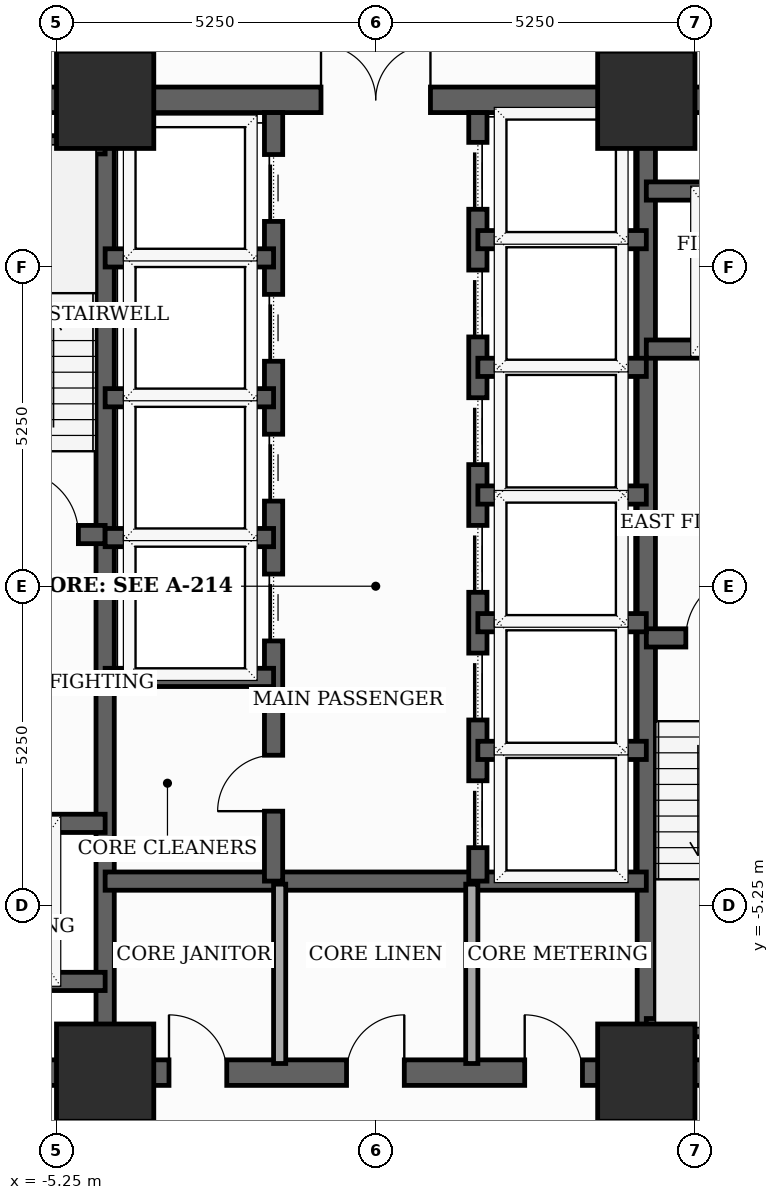
"""IFC4 building model, lengths in metres.
Left out: names, types, materials, properties, quantities, classifications, styles, units other than length and angle.
Written with IfcOpenShell. Run it as: python <this file> out.ifc"""

import sys

from ifc_helpers import new_model, si_unit, direction, frame, frame_2d, origin, origin_2d, place, context, subcontext, project, spatial, rectangle, extrude, element, fill, save


model = new_model("IFC4")
c1 = context("Model", 3, precision=1e-05, world=origin(), true_north=direction((0.0, 1.0)))
c2 = subcontext(c1, "Body", "Model", "MODEL_VIEW")
j1 = project(units=[si_unit("LENGTHUNIT", "METRE"), si_unit("PLANEANGLEUNIT", "RADIAN")], contexts=[c1])
p1 = place(None, origin())
s1 = spatial("IfcSite", under=j1, at=p1, CompositionType="ELEMENT")
p2 = place(p1, origin())
s2 = spatial("IfcBuilding", under=s1, at=p2, CompositionType="ELEMENT")
p3 = place(p2, frame((0.0, 0.0, 74.1)))
s3 = spatial("IfcBuildingStorey", under=s2, at=p3, CompositionType="ELEMENT", Elevation=74.1)
for number, where, z_axis, x_axis in (
    (1, (-4.45, -8.0, 0.0), (0.0, 0.0, 1.0), (1.0, 0.0, 0.0)),
    (2, (4.45, -8.0, 0.0), (0.0, 0.0, 1.0), (1.0, 0.0, 0.0)),
    (3, (4.45, 8.0, 0.0), (0.0, 0.0, 1.0), (1.0, 0.0, 0.0)),
    (4, (-4.45, 8.0, 0.0), (0.0, 0.0, 1.0), (1.0, 0.0, 0.0)),
):
    element("IfcColumn", number, at=place(p3, frame(where, z_axis=z_axis, x_axis=x_axis)), inside=s3, PredefinedType="COLUMN", context=c2, shape_type="SweptSolid", body=[
        extrude(rectangle(XDim=1.6, YDim=1.6, at=origin_2d()), origin(), (0.0, 0.0, 1.0), 3.7),
    ])
p4 = place(p3, frame((-8.0, -8.0, 0.0), z_axis=(0.0, 0.0, 1.0), x_axis=(1.0, 0.0, 0.0)))
e5 = element("IfcWall", 5, at=p4, inside=s3, PredefinedType="SHEAR", context=c2, shape_type="SweptSolid", body=[
    extrude(rectangle(XDim=16.0, YDim=0.42, at=frame_2d((8.0, 0.0))), origin(), (0.0, 0.0, 1.0), 3.5),
])
p5 = place(p4, frame((4.6, 0.0, 0.0)))
e6 = element("IfcOpeningElement", 6, at=p5, cuts=e5, PredefinedType="OPENING", context=c2, shape_type="SweptSolid", body=[
    extrude(rectangle(XDim=0.95, YDim=2.1, at=frame_2d((0.475, 1.05))), frame((0.0, 0.22, 0.0), z_axis=(0.0, -1.0, 0.0), x_axis=(1.0, 0.0, 0.0)), (0.0, 0.0, 1.0), 0.44),
])
p6 = place(p4, frame((7.52, 0.0, 0.0)))
e7 = element("IfcOpeningElement", 7, at=p6, cuts=e5, PredefinedType="OPENING", context=c2, shape_type="SweptSolid", body=[
    extrude(rectangle(XDim=0.95, YDim=2.1, at=frame_2d((0.475, 1.05))), frame((0.0, 0.22, 0.0), z_axis=(0.0, -1.0, 0.0), x_axis=(1.0, 0.0, 0.0)), (0.0, 0.0, 1.0), 0.44),
])
p7 = place(p4, frame((10.45, 0.0, 0.0)))
e8 = element("IfcOpeningElement", 8, at=p7, cuts=e5, PredefinedType="OPENING", context=c2, shape_type="SweptSolid", body=[
    extrude(rectangle(XDim=0.95, YDim=2.1, at=frame_2d((0.475, 1.05))), frame((0.0, 0.22, 0.0), z_axis=(0.0, -1.0, 0.0), x_axis=(1.0, 0.0, 0.0)), (0.0, 0.0, 1.0), 0.44),
])
p8 = place(p3, frame((-8.0, 8.0, 0.0), z_axis=(0.0, 0.0, 1.0), x_axis=(1.0, 0.0, 0.0)))
e9 = element("IfcWall", 9, at=p8, inside=s3, PredefinedType="SHEAR", context=c2, shape_type="SweptSolid", body=[
    extrude(rectangle(XDim=16.0, YDim=0.42, at=frame_2d((8.0, 0.0))), origin(), (0.0, 0.0, 1.0), 3.5),
])
p9 = place(p8, frame((7.1, 0.0, 0.0)))
e10 = element("IfcOpeningElement", 10, at=p9, cuts=e9, PredefinedType="OPENING", context=c2, shape_type="SweptSolid", body=[
    extrude(rectangle(XDim=1.8, YDim=2.15, at=frame_2d((0.9, 1.075))), frame((0.0, 0.22, 0.0), z_axis=(0.0, -1.0, 0.0), x_axis=(1.0, 0.0, 0.0)), (0.0, 0.0, 1.0), 0.44),
])
for number, where, z_axis, x_axis in (
    (11, (-4.45, -7.79, 0.0), (0.0, 0.0, 1.0), (0.0, 1.0, 0.0)),
    (12, (4.45, -7.79, 0.0), (0.0, 0.0, 1.0), (0.0, 1.0, 0.0)),
):
    element("IfcWall", number, at=place(p3, frame(where, z_axis=z_axis, x_axis=x_axis)), inside=s3, PredefinedType="SHEAR", context=c2, shape_type="SweptSolid", body=[
        extrude(rectangle(XDim=15.58, YDim=0.3, at=frame_2d((7.79, 0.0))), origin(), (0.0, 0.0, 1.0), 3.5),
    ])
p10 = place(p3, frame((-7.79, 0.85, 0.0), z_axis=(0.0, 0.0, 1.0), x_axis=(1.0, 0.0, 0.0)))
e13 = element("IfcWall", 13, at=p10, inside=s3, PredefinedType="SHEAR", context=c2, shape_type="SweptSolid", body=[
    extrude(rectangle(XDim=3.34, YDim=0.3, at=frame_2d((1.67, 0.0))), origin(), (0.0, 0.0, 1.0), 3.5),
])
p11 = place(p10, frame((1.85, 0.0, 0.0)))
e14 = element("IfcOpeningElement", 14, at=p11, cuts=e13, PredefinedType="OPENING", context=c2, shape_type="SweptSolid", body=[
    extrude(rectangle(XDim=1.05, YDim=2.15, at=frame_2d((0.525, 1.075))), frame((0.0, 0.16, 0.0), z_axis=(0.0, -1.0, 0.0), x_axis=(1.0, 0.0, 0.0)), (0.0, 0.0, 1.0), 0.32),
])
p12 = place(p3, frame((-7.79, 7.26, 0.0), z_axis=(0.0, 0.0, 1.0), x_axis=(1.0, 0.0, 0.0)))
e15 = element("IfcWall", 15, at=p12, inside=s3, PredefinedType="SHEAR", context=c2, shape_type="SweptSolid", body=[
    extrude(rectangle(XDim=3.34, YDim=0.3, at=frame_2d((1.67, 0.0))), origin(), (0.0, 0.0, 1.0), 3.5),
])
p13 = place(p3, frame((4.45, -0.85, 0.0), z_axis=(0.0, 0.0, 1.0), x_axis=(1.0, 0.0, 0.0)))
e16 = element("IfcWall", 16, at=p13, inside=s3, PredefinedType="SHEAR", context=c2, shape_type="SweptSolid", body=[
    extrude(rectangle(XDim=3.34, YDim=0.3, at=frame_2d((1.67, 0.0))), origin(), (0.0, 0.0, 1.0), 3.5),
])
p14 = place(p13, frame((0.65, 0.0, 0.0)))
e17 = element("IfcOpeningElement", 17, at=p14, cuts=e16, PredefinedType="OPENING", context=c2, shape_type="SweptSolid", body=[
    extrude(rectangle(XDim=1.05, YDim=2.15, at=frame_2d((0.525, 1.075))), frame((0.0, 0.16, 0.0), z_axis=(0.0, -1.0, 0.0), x_axis=(1.0, 0.0, 0.0)), (0.0, 0.0, 1.0), 0.32),
])
p15 = place(p3, frame((4.45, -7.26, 0.0), z_axis=(0.0, 0.0, 1.0), x_axis=(1.0, 0.0, 0.0)))
e18 = element("IfcWall", 18, at=p15, inside=s3, PredefinedType="SHEAR", context=c2, shape_type="SweptSolid", body=[
    extrude(rectangle(XDim=3.55, YDim=0.3, at=frame_2d((1.775, 0.0))), origin(), (0.0, 0.0, 1.0), 3.5),
])
p16 = place(p3, frame((-7.79, -3.9, 0.0), z_axis=(0.0, 0.0, 1.0), x_axis=(1.0, 0.0, 0.0)))
e19 = element("IfcWall", 19, at=p16, inside=s3, PredefinedType="SHEAR", context=c2, shape_type="SweptSolid", body=[
    extrude(rectangle(XDim=3.34, YDim=0.3, at=frame_2d((1.67, 0.0))), origin(), (0.0, 0.0, 1.0), 3.5),
])
p17 = place(p16, frame((1.27, 0.0, 0.0)))
e20 = element("IfcOpeningElement", 20, at=p17, cuts=e19, PredefinedType="OPENING", context=c2, shape_type="SweptSolid", body=[
    extrude(rectangle(XDim=1.1, YDim=2.1, at=frame_2d((0.55, 1.05))), frame((0.0, 0.16, 0.0), z_axis=(0.0, -1.0, 0.0), x_axis=(1.0, 0.0, 0.0)), (0.0, 0.0, 1.0), 0.32),
])
p18 = place(p3, frame((-7.79, -6.5, 0.0), z_axis=(0.0, 0.0, 1.0), x_axis=(1.0, 0.0, 0.0)))
e21 = element("IfcWall", 21, at=p18, inside=s3, PredefinedType="SHEAR", context=c2, shape_type="SweptSolid", body=[
    extrude(rectangle(XDim=3.34, YDim=0.3, at=frame_2d((1.67, 0.0))), origin(), (0.0, 0.0, 1.0), 3.5),
])
p19 = place(p3, frame((4.45, 3.9, 0.0), z_axis=(0.0, 0.0, 1.0), x_axis=(1.0, 0.0, 0.0)))
e22 = element("IfcWall", 22, at=p19, inside=s3, PredefinedType="SHEAR", context=c2, shape_type="SweptSolid", body=[
    extrude(rectangle(XDim=3.34, YDim=0.3, at=frame_2d((1.67, 0.0))), origin(), (0.0, 0.0, 1.0), 3.5),
])
p20 = place(p19, frame((1.18, 0.0, 0.0)))
e23 = element("IfcOpeningElement", 23, at=p20, cuts=e22, PredefinedType="OPENING", context=c2, shape_type="SweptSolid", body=[
    extrude(rectangle(XDim=1.1, YDim=2.1, at=frame_2d((0.55, 1.05))), frame((0.0, 0.16, 0.0), z_axis=(0.0, -1.0, 0.0), x_axis=(1.0, 0.0, 0.0)), (0.0, 0.0, 1.0), 0.32),
])
p21 = place(p3, frame((4.45, 6.5, 0.0), z_axis=(0.0, 0.0, 1.0), x_axis=(1.0, 0.0, 0.0)))
e24 = element("IfcWall", 24, at=p21, inside=s3, PredefinedType="SHEAR", context=c2, shape_type="SweptSolid", body=[
    extrude(rectangle(XDim=3.34, YDim=0.3, at=frame_2d((1.67, 0.0))), origin(), (0.0, 0.0, 1.0), 3.5),
])
p22 = place(p3, frame((-4.45, -4.85, 0.0), z_axis=(0.0, 0.0, 1.0), x_axis=(1.0, 0.0, 0.0)))
e25 = element("IfcWall", 25, at=p22, inside=s3, PredefinedType="SHEAR", context=c2, shape_type="SweptSolid", body=[
    extrude(rectangle(XDim=8.9, YDim=0.3, at=frame_2d((4.45, 0.0))), origin(), (0.0, 0.0, 1.0), 3.5),
])
p23 = place(p3, frame((-1.68, -4.85, 0.0), z_axis=(0.0, 0.0, 1.0), x_axis=(0.0, 1.0, 0.0)))
e26 = element("IfcWall", 26, at=p23, inside=s3, PredefinedType="SHEAR", context=c2, shape_type="SweptSolid", body=[
    extrude(rectangle(XDim=12.64, YDim=0.3, at=frame_2d((6.32, 0.0))), origin(), (0.0, 0.0, 1.0), 3.5),
])
p24 = place(p23, frame((3.95, 0.0, 0.0)))
e27 = element("IfcOpeningElement", 27, at=p24, cuts=e26, PredefinedType="OPENING", context=c2, shape_type="SweptSolid", body=[
    extrude(rectangle(XDim=1.1, YDim=2.1, at=frame_2d((0.55, 1.05))), frame((0.0, 0.16, 0.0), z_axis=(0.0, -1.0, 0.0), x_axis=(1.0, 0.0, 0.0)), (0.0, 0.0, 1.0), 0.32),
])
p25 = place(p23, frame((6.25, 0.0, 0.0)))
e28 = element("IfcOpeningElement", 28, at=p25, cuts=e26, PredefinedType="OPENING", context=c2, shape_type="SweptSolid", body=[
    extrude(rectangle(XDim=1.1, YDim=2.1, at=frame_2d((0.55, 1.05))), frame((0.0, 0.16, 0.0), z_axis=(0.0, -1.0, 0.0), x_axis=(1.0, 0.0, 0.0)), (0.0, 0.0, 1.0), 0.32),
])
p26 = place(p23, frame((8.55, 0.0, 0.0)))
e29 = element("IfcOpeningElement", 29, at=p26, cuts=e26, PredefinedType="OPENING", context=c2, shape_type="SweptSolid", body=[
    extrude(rectangle(XDim=1.1, YDim=2.1, at=frame_2d((0.55, 1.05))), frame((0.0, 0.16, 0.0), z_axis=(0.0, -1.0, 0.0), x_axis=(1.0, 0.0, 0.0)), (0.0, 0.0, 1.0), 0.32),
])
p27 = place(p23, frame((10.85, 0.0, 0.0)))
e30 = element("IfcOpeningElement", 30, at=p27, cuts=e26, PredefinedType="OPENING", context=c2, shape_type="SweptSolid", body=[
    extrude(rectangle(XDim=1.1, YDim=2.1, at=frame_2d((0.55, 1.05))), frame((0.0, 0.16, 0.0), z_axis=(0.0, -1.0, 0.0), x_axis=(1.0, 0.0, 0.0)), (0.0, 0.0, 1.0), 0.32),
])
p28 = place(p23, frame((1.15, 0.0, 0.0)))
e31 = element("IfcOpeningElement", 31, at=p28, cuts=e26, PredefinedType="OPENING", context=c2, shape_type="SweptSolid", body=[
    extrude(rectangle(XDim=0.92, YDim=2.1, at=frame_2d((0.46, 1.05))), frame((0.0, 0.16, 0.0), z_axis=(0.0, -1.0, 0.0), x_axis=(1.0, 0.0, 0.0)), (0.0, 0.0, 1.0), 0.32),
])
p29 = place(p3, frame((1.68, -4.85, 0.0), z_axis=(0.0, 0.0, 1.0), x_axis=(0.0, 1.0, 0.0)))
e32 = element("IfcWall", 32, at=p29, inside=s3, PredefinedType="SHEAR", context=c2, shape_type="SweptSolid", body=[
    extrude(rectangle(XDim=12.64, YDim=0.3, at=frame_2d((6.32, 0.0))), origin(), (0.0, 0.0, 1.0), 3.5),
])
p30 = place(p29, frame((0.55, 0.0, 0.0)))
e33 = element("IfcOpeningElement", 33, at=p30, cuts=e32, PredefinedType="OPENING", context=c2, shape_type="SweptSolid", body=[
    extrude(rectangle(XDim=1.1, YDim=2.1, at=frame_2d((0.55, 1.05))), frame((0.0, 0.16, 0.0), z_axis=(0.0, -1.0, 0.0), x_axis=(1.0, 0.0, 0.0)), (0.0, 0.0, 1.0), 0.32),
])
p31 = place(p29, frame((2.65, 0.0, 0.0)))
e34 = element("IfcOpeningElement", 34, at=p31, cuts=e32, PredefinedType="OPENING", context=c2, shape_type="SweptSolid", body=[
    extrude(rectangle(XDim=1.1, YDim=2.1, at=frame_2d((0.55, 1.05))), frame((0.0, 0.16, 0.0), z_axis=(0.0, -1.0, 0.0), x_axis=(1.0, 0.0, 0.0)), (0.0, 0.0, 1.0), 0.32),
])
p32 = place(p29, frame((4.75, 0.0, 0.0)))
e35 = element("IfcOpeningElement", 35, at=p32, cuts=e32, PredefinedType="OPENING", context=c2, shape_type="SweptSolid", body=[
    extrude(rectangle(XDim=1.1, YDim=2.1, at=frame_2d((0.55, 1.05))), frame((0.0, 0.16, 0.0), z_axis=(0.0, -1.0, 0.0), x_axis=(1.0, 0.0, 0.0)), (0.0, 0.0, 1.0), 0.32),
])
p33 = place(p29, frame((6.85, 0.0, 0.0)))
e36 = element("IfcOpeningElement", 36, at=p33, cuts=e32, PredefinedType="OPENING", context=c2, shape_type="SweptSolid", body=[
    extrude(rectangle(XDim=1.1, YDim=2.1, at=frame_2d((0.55, 1.05))), frame((0.0, 0.16, 0.0), z_axis=(0.0, -1.0, 0.0), x_axis=(1.0, 0.0, 0.0)), (0.0, 0.0, 1.0), 0.32),
])
p34 = place(p29, frame((8.95, 0.0, 0.0)))
e37 = element("IfcOpeningElement", 37, at=p34, cuts=e32, PredefinedType="OPENING", context=c2, shape_type="SweptSolid", body=[
    extrude(rectangle(XDim=1.1, YDim=2.1, at=frame_2d((0.55, 1.05))), frame((0.0, 0.16, 0.0), z_axis=(0.0, -1.0, 0.0), x_axis=(1.0, 0.0, 0.0)), (0.0, 0.0, 1.0), 0.32),
])
p35 = place(p29, frame((11.05, 0.0, 0.0)))
e38 = element("IfcOpeningElement", 38, at=p35, cuts=e32, PredefinedType="OPENING", context=c2, shape_type="SweptSolid", body=[
    extrude(rectangle(XDim=1.1, YDim=2.1, at=frame_2d((0.55, 1.05))), frame((0.0, 0.16, 0.0), z_axis=(0.0, -1.0, 0.0), x_axis=(1.0, 0.0, 0.0)), (0.0, 0.0, 1.0), 0.32),
])
for number, where, z_axis, x_axis in (
    (39, (-4.45, -1.5, 0.0), (0.0, 0.0, 1.0), (1.0, 0.0, 0.0)),
    (40, (-4.45, 0.8, 0.0), (0.0, 0.0, 1.0), (1.0, 0.0, 0.0)),
    (41, (-4.45, 3.1, 0.0), (0.0, 0.0, 1.0), (1.0, 0.0, 0.0)),
    (42, (-4.45, 5.4, 0.0), (0.0, 0.0, 1.0), (1.0, 0.0, 0.0)),
    (43, (1.68, 1.5, 0.0), (0.0, 0.0, 1.0), (1.0, 0.0, 0.0)),
    (44, (1.68, 3.6, 0.0), (0.0, 0.0, 1.0), (1.0, 0.0, 0.0)),
    (45, (1.68, 5.7, 0.0), (0.0, 0.0, 1.0), (1.0, 0.0, 0.0)),
    (46, (1.68, -2.7, 0.0), (0.0, 0.0, 1.0), (1.0, 0.0, 0.0)),
    (47, (1.68, -0.6, 0.0), (0.0, 0.0, 1.0), (1.0, 0.0, 0.0)),
):
    element("IfcWall", number, at=place(p3, frame(where, z_axis=z_axis, x_axis=x_axis)), inside=s3, PredefinedType="SHEAR", context=c2, shape_type="SweptSolid", body=[
        extrude(rectangle(XDim=2.77, YDim=0.3, at=frame_2d((1.385, 0.0))), origin(), (0.0, 0.0, 1.0), 3.5),
    ])
for number, where, z_axis, x_axis in (
    (48, (-1.58, -7.85, 0.0), (0.0, 0.0, 1.0), (0.0, 1.0, 0.0)),
    (49, (1.58, -7.85, 0.0), (0.0, 0.0, 1.0), (0.0, 1.0, 0.0)),
):
    element("IfcWall", number, at=place(p3, frame(where, z_axis=z_axis, x_axis=x_axis)), inside=s3, PredefinedType="SOLIDWALL", context=c2, shape_type="SweptSolid", body=[
        extrude(rectangle(XDim=2.95, YDim=0.2, at=frame_2d((1.475, 0.0))), origin(), (0.0, 0.0, 1.0), 2.885),
    ])
p36 = place(p5, origin())
e50 = element("IfcDoor", 50, at=p36, inside=s3, OperationType="SINGLE_SWING_LEFT", PredefinedType="DOOR", context=c2, shape_type="SweptSolid", body=[
    extrude(rectangle(XDim=0.95, YDim=2.1, at=frame_2d((0.475, 1.05))), frame((0.0, 0.025, 0.0), z_axis=(0.0, -1.0, 0.0), x_axis=(1.0, 0.0, 0.0)), (0.0, 0.0, 1.0), 0.05),
])
fill(e6, e50)
p37 = place(p6, origin())
e51 = element("IfcDoor", 51, at=p37, inside=s3, OperationType="SINGLE_SWING_RIGHT", PredefinedType="DOOR", context=c2, shape_type="SweptSolid", body=[
    extrude(rectangle(XDim=0.95, YDim=2.1, at=frame_2d((0.475, 1.05))), frame((0.0, 0.025, 0.0), z_axis=(0.0, -1.0, 0.0), x_axis=(1.0, 0.0, 0.0)), (0.0, 0.0, 1.0), 0.05),
])
fill(e7, e51)
p38 = place(p7, origin())
e52 = element("IfcDoor", 52, at=p38, inside=s3, OperationType="SINGLE_SWING_LEFT", PredefinedType="DOOR", context=c2, shape_type="SweptSolid", body=[
    extrude(rectangle(XDim=0.95, YDim=2.1, at=frame_2d((0.475, 1.05))), frame((0.0, 0.025, 0.0), z_axis=(0.0, -1.0, 0.0), x_axis=(1.0, 0.0, 0.0)), (0.0, 0.0, 1.0), 0.05),
])
fill(e8, e52)
p39 = place(p9, origin())
e53 = element("IfcDoor", 53, at=p39, inside=s3, OperationType="DOUBLE_DOOR_SINGLE_SWING", PredefinedType="DOOR", context=c2, shape_type="SweptSolid", body=[
    extrude(rectangle(XDim=1.8, YDim=2.15, at=frame_2d((0.9, 1.075))), frame((0.0, 0.025, 0.0), z_axis=(0.0, -1.0, 0.0), x_axis=(1.0, 0.0, 0.0)), (0.0, 0.0, 1.0), 0.05),
])
fill(e10, e53)
p40 = place(p11, origin())
e54 = element("IfcDoor", 54, at=p40, inside=s3, OperationType="SINGLE_SWING_LEFT", PredefinedType="DOOR", context=c2, shape_type="SweptSolid", body=[
    extrude(rectangle(XDim=1.05, YDim=2.15, at=frame_2d((0.525, 1.075))), frame((0.0, 0.025, 0.0), z_axis=(0.0, -1.0, 0.0), x_axis=(1.0, 0.0, 0.0)), (0.0, 0.0, 1.0), 0.05),
])
fill(e14, e54)
p41 = place(p14, origin())
e55 = element("IfcDoor", 55, at=p41, inside=s3, OperationType="SINGLE_SWING_RIGHT", PredefinedType="DOOR", context=c2, shape_type="SweptSolid", body=[
    extrude(rectangle(XDim=1.05, YDim=2.15, at=frame_2d((0.525, 1.075))), frame((0.0, 0.025, 0.0), z_axis=(0.0, -1.0, 0.0), x_axis=(1.0, 0.0, 0.0)), (0.0, 0.0, 1.0), 0.05),
])
fill(e17, e55)
p42 = place(p24, origin())
e56 = element("IfcDoor", 56, at=p42, inside=s3, OperationType="SLIDING_TO_LEFT", PredefinedType="DOOR", context=c2, shape_type="SweptSolid", body=[
    extrude(rectangle(XDim=1.1, YDim=2.1, at=frame_2d((0.55, 1.05))), frame((0.0, 0.025, 0.0), z_axis=(0.0, -1.0, 0.0), x_axis=(1.0, 0.0, 0.0)), (0.0, 0.0, 1.0), 0.05),
])
fill(e27, e56)
p43 = place(p25, origin())
e57 = element("IfcDoor", 57, at=p43, inside=s3, OperationType="SLIDING_TO_LEFT", PredefinedType="DOOR", context=c2, shape_type="SweptSolid", body=[
    extrude(rectangle(XDim=1.1, YDim=2.1, at=frame_2d((0.55, 1.05))), frame((0.0, 0.025, 0.0), z_axis=(0.0, -1.0, 0.0), x_axis=(1.0, 0.0, 0.0)), (0.0, 0.0, 1.0), 0.05),
])
fill(e28, e57)
p44 = place(p26, origin())
e58 = element("IfcDoor", 58, at=p44, inside=s3, OperationType="SLIDING_TO_LEFT", PredefinedType="DOOR", context=c2, shape_type="SweptSolid", body=[
    extrude(rectangle(XDim=1.1, YDim=2.1, at=frame_2d((0.55, 1.05))), frame((0.0, 0.025, 0.0), z_axis=(0.0, -1.0, 0.0), x_axis=(1.0, 0.0, 0.0)), (0.0, 0.0, 1.0), 0.05),
])
fill(e29, e58)
p45 = place(p27, origin())
e59 = element("IfcDoor", 59, at=p45, inside=s3, OperationType="SLIDING_TO_LEFT", PredefinedType="DOOR", context=c2, shape_type="SweptSolid", body=[
    extrude(rectangle(XDim=1.1, YDim=2.1, at=frame_2d((0.55, 1.05))), frame((0.0, 0.025, 0.0), z_axis=(0.0, -1.0, 0.0), x_axis=(1.0, 0.0, 0.0)), (0.0, 0.0, 1.0), 0.05),
])
fill(e30, e59)
p46 = place(p28, origin())
e60 = element("IfcDoor", 60, at=p46, inside=s3, OperationType="SINGLE_SWING_LEFT", PredefinedType="DOOR", context=c2, shape_type="SweptSolid", body=[
    extrude(rectangle(XDim=0.92, YDim=2.1, at=frame_2d((0.46, 1.05))), frame((0.0, 0.025, 0.0), z_axis=(0.0, -1.0, 0.0), x_axis=(1.0, 0.0, 0.0)), (0.0, 0.0, 1.0), 0.05),
])
fill(e31, e60)
p47 = place(p30, origin())
e61 = element("IfcDoor", 61, at=p47, inside=s3, OperationType="SLIDING_TO_LEFT", PredefinedType="DOOR", context=c2, shape_type="SweptSolid", body=[
    extrude(rectangle(XDim=1.1, YDim=2.1, at=frame_2d((0.55, 1.05))), frame((0.0, 0.025, 0.0), z_axis=(0.0, -1.0, 0.0), x_axis=(1.0, 0.0, 0.0)), (0.0, 0.0, 1.0), 0.05),
])
fill(e33, e61)
p48 = place(p31, origin())
e62 = element("IfcDoor", 62, at=p48, inside=s3, OperationType="SLIDING_TO_LEFT", PredefinedType="DOOR", context=c2, shape_type="SweptSolid", body=[
    extrude(rectangle(XDim=1.1, YDim=2.1, at=frame_2d((0.55, 1.05))), frame((0.0, 0.025, 0.0), z_axis=(0.0, -1.0, 0.0), x_axis=(1.0, 0.0, 0.0)), (0.0, 0.0, 1.0), 0.05),
])
fill(e34, e62)
p49 = place(p32, origin())
e63 = element("IfcDoor", 63, at=p49, inside=s3, OperationType="SLIDING_TO_LEFT", PredefinedType="DOOR", context=c2, shape_type="SweptSolid", body=[
    extrude(rectangle(XDim=1.1, YDim=2.1, at=frame_2d((0.55, 1.05))), frame((0.0, 0.025, 0.0), z_axis=(0.0, -1.0, 0.0), x_axis=(1.0, 0.0, 0.0)), (0.0, 0.0, 1.0), 0.05),
])
fill(e35, e63)
p50 = place(p33, origin())
e64 = element("IfcDoor", 64, at=p50, inside=s3, OperationType="SLIDING_TO_LEFT", PredefinedType="DOOR", context=c2, shape_type="SweptSolid", body=[
    extrude(rectangle(XDim=1.1, YDim=2.1, at=frame_2d((0.55, 1.05))), frame((0.0, 0.025, 0.0), z_axis=(0.0, -1.0, 0.0), x_axis=(1.0, 0.0, 0.0)), (0.0, 0.0, 1.0), 0.05),
])
fill(e36, e64)
p51 = place(p34, origin())
e65 = element("IfcDoor", 65, at=p51, inside=s3, OperationType="SLIDING_TO_LEFT", PredefinedType="DOOR", context=c2, shape_type="SweptSolid", body=[
    extrude(rectangle(XDim=1.1, YDim=2.1, at=frame_2d((0.55, 1.05))), frame((0.0, 0.025, 0.0), z_axis=(0.0, -1.0, 0.0), x_axis=(1.0, 0.0, 0.0)), (0.0, 0.0, 1.0), 0.05),
])
fill(e37, e65)
p52 = place(p35, origin())
e66 = element("IfcDoor", 66, at=p52, inside=s3, OperationType="SLIDING_TO_LEFT", PredefinedType="DOOR", context=c2, shape_type="SweptSolid", body=[
    extrude(rectangle(XDim=1.1, YDim=2.1, at=frame_2d((0.55, 1.05))), frame((0.0, 0.025, 0.0), z_axis=(0.0, -1.0, 0.0), x_axis=(1.0, 0.0, 0.0)), (0.0, 0.0, 1.0), 0.05),
])
fill(e38, e66)
save(model, sys.argv[1])
